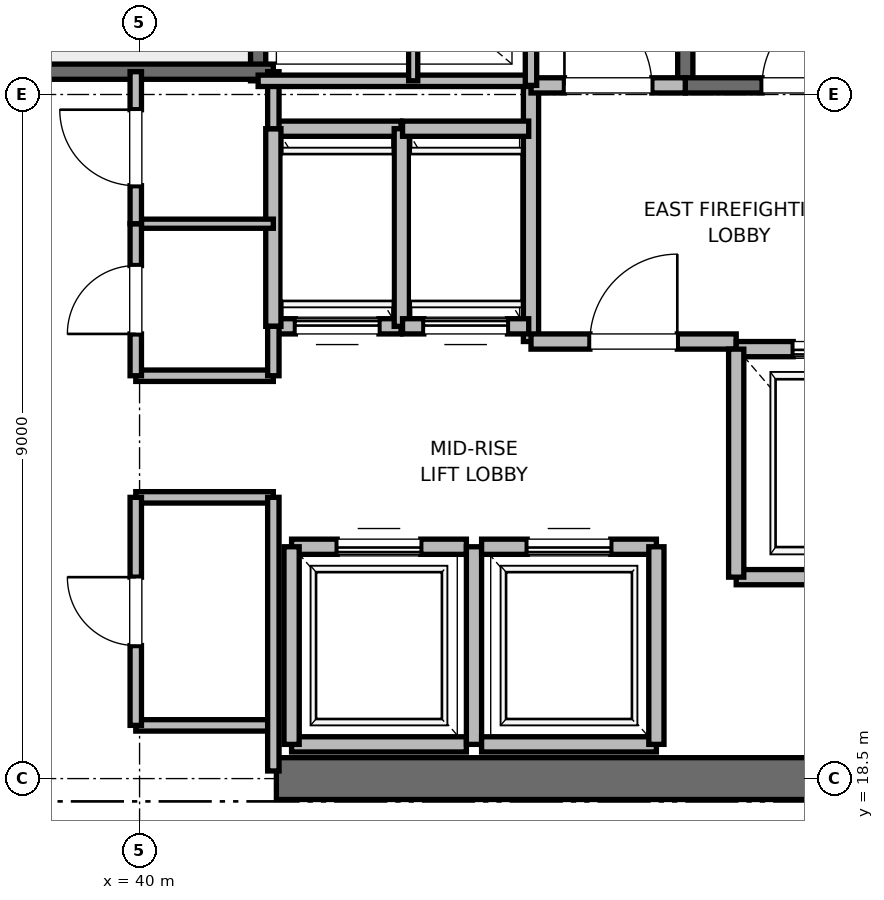
"""IFC4 building model, lengths in metres.
Left out: names, types, materials, properties, quantities, classifications, styles, units other than length and angle.
Written with IfcOpenShell. Run it as: python <this file> out.ifc"""

import sys

from ifc_helpers import new_model, si_unit, direction, frame, frame_2d, origin, place, context, subcontext, project, spatial, rectangle, extrude, element, fill, save


model = new_model("IFC4")
c1 = context("Model", 3, precision=1e-05, world=origin(), true_north=direction((0.0, 1.0)))
c2 = subcontext(c1, "Body", "Model", "MODEL_VIEW")
j1 = project(units=[si_unit("LENGTHUNIT", "METRE"), si_unit("PLANEANGLEUNIT", "RADIAN")], contexts=[c1])
p1 = place(None, origin())
s1 = spatial("IfcSite", under=j1, at=p1, CompositionType="ELEMENT")
p2 = place(p1, origin())
s2 = spatial("IfcBuilding", under=s1, at=p2, CompositionType="ELEMENT")
p3 = place(p2, frame((0.0, 0.0, 184.4)))
s3 = spatial("IfcBuildingStorey", under=s2, at=p3, CompositionType="ELEMENT", Elevation=184.4)
p4 = place(p3, frame((41.8, 18.5, 0.0), z_axis=(0.0, 0.0, 1.0), x_axis=(1.0, 0.0, 0.0)))
e1 = element("IfcWall", 1, at=p4, inside=s3, PredefinedType="SHEAR", context=c2, shape_type="SweptSolid", body=[
    extrude(rectangle(XDim=9.2, YDim=0.55, at=frame_2d((4.6, 0.0))), origin(), (0.0, 0.0, 1.0), 4.7),
])
p5 = place(p3, frame((47.18, 27.62, 0.0), z_axis=(0.0, 0.0, 1.0), x_axis=(0.0, 1.0, 0.0)))
e2 = element("IfcWall", 2, at=p5, inside=s3, PredefinedType="SOLIDWALL", context=c2, shape_type="SweptSolid", body=[
    extrude(rectangle(XDim=8.18, YDim=0.2, at=frame_2d((4.09, 0.0))), origin(), (0.0, 0.0, 1.0), 4.7),
])
p6 = place(p3, frame((47.18, 27.62, 0.0), z_axis=(0.0, 0.0, 1.0), x_axis=(1.0, 0.0, 0.0)))
e3 = element("IfcWall", 3, at=p6, inside=s3, PredefinedType="SOLIDWALL", context=c2, shape_type="SweptSolid", body=[
    extrude(rectangle(XDim=3.12, YDim=0.2, at=frame_2d((1.56, 0.0))), origin(), (0.0, 0.0, 1.0), 4.7),
])
p7 = place(p6, frame((1.01, 0.0, 0.0)))
e4 = element("IfcOpeningElement", 4, at=p7, cuts=e3, PredefinedType="OPENING", context=c2, shape_type="SweptSolid", body=[
    extrude(rectangle(XDim=1.1, YDim=2.15, at=frame_2d((0.55, 1.075))), frame((0.0, 0.1, 0.0), z_axis=(0.0, -1.0, 0.0), x_axis=(1.0, 0.0, 0.0)), (0.0, 0.0, 1.0), 0.2),
])
p8 = place(p3, frame((41.56, 27.68, 0.0), z_axis=(0.0, 0.0, 1.0), x_axis=(0.0, 1.0, 0.0)))
e5 = element("IfcWall", 5, at=p8, inside=s3, PredefinedType="SOLIDWALL", context=c2, shape_type="SweptSolid", body=[
    extrude(rectangle(XDim=8.57, YDim=0.2, at=frame_2d((4.285, 0.0))), origin(), (0.0, 0.0, 1.0), 4.7),
])
p9 = place(p3, frame((38.44, 27.8, 0.0), z_axis=(0.0, 0.0, 1.0), x_axis=(1.0, 0.0, 0.0)))
e6 = element("IfcWall", 6, at=p9, inside=s3, PredefinedType="SOLIDWALL", context=c2, shape_type="SweptSolid", body=[
    extrude(rectangle(XDim=3.32, YDim=0.2, at=frame_2d((1.66, 0.0))), origin(), (0.0, 0.0, 1.0), 4.7),
])
p10 = place(p3, frame((45.15, 24.25, 0.0), z_axis=(0.0, 0.0, 1.0), x_axis=(0.0, 1.0, 0.0)))
e7 = element("IfcWall", 7, at=p10, inside=s3, PredefinedType="PARTITIONING", context=c2, shape_type="SweptSolid", body=[
    extrude(rectangle(XDim=3.37, YDim=0.2, at=frame_2d((1.685, 0.0))), origin(), (0.0, 0.0, 1.0), 4.7),
])
p11 = place(p3, frame((45.15, 24.25, 0.0), z_axis=(0.0, 0.0, 1.0), x_axis=(1.0, 0.0, 0.0)))
e8 = element("IfcWall", 8, at=p11, inside=s3, PredefinedType="PARTITIONING", context=c2, shape_type="SweptSolid", body=[
    extrude(rectangle(XDim=2.7, YDim=0.2, at=frame_2d((1.35, 0.0))), origin(), (0.0, 0.0, 1.0), 4.7),
])
p12 = place(p11, frame((0.775, 0.0, 0.0)))
e9 = element("IfcOpeningElement", 9, at=p12, cuts=e8, PredefinedType="OPENING", context=c2, shape_type="SweptSolid", body=[
    extrude(rectangle(XDim=1.15, YDim=2.2, at=frame_2d((0.575, 1.1))), frame((0.0, 0.1, 0.0), z_axis=(0.0, -1.0, 0.0), x_axis=(1.0, 0.0, 0.0)), (0.0, 0.0, 1.0), 0.2),
])
p13 = place(p3, frame((45.15, 27.62, 0.0), z_axis=(0.0, 0.0, 1.0), x_axis=(1.0, 0.0, 0.0)))
e10 = element("IfcWall", 10, at=p13, inside=s3, PredefinedType="PARTITIONING", context=c2, shape_type="SweptSolid", body=[
    extrude(rectangle(XDim=2.03, YDim=0.2, at=frame_2d((1.015, 0.0))), origin(), (0.0, 0.0, 1.0), 4.7),
])
p14 = place(p13, frame((0.44, 0.0, 0.0)))
e11 = element("IfcOpeningElement", 11, at=p14, cuts=e10, PredefinedType="OPENING", context=c2, shape_type="SweptSolid", body=[
    extrude(rectangle(XDim=1.15, YDim=2.2, at=frame_2d((0.575, 1.1))), frame((0.0, 0.1, 0.0), z_axis=(0.0, -1.0, 0.0), x_axis=(1.0, 0.0, 0.0)), (0.0, 0.0, 1.0), 0.2),
])
p15 = place(p3, frame((47.85, 21.15, 0.0), z_axis=(0.0, 0.0, 1.0), x_axis=(1.0, 0.0, 0.0)))
e12 = element("IfcWall", 12, at=p15, inside=s3, PredefinedType="SOLIDWALL", context=c2, shape_type="SweptSolid", body=[
    extrude(rectangle(XDim=2.6, YDim=0.2, at=frame_2d((1.3, 0.0))), origin(), (0.0, 0.0, 1.0), 4.7),
])
p16 = place(p3, frame((50.45, 24.15, 0.0), z_axis=(0.0, 0.0, 1.0), x_axis=(-1.0, 0.0, 0.0)))
e13 = element("IfcWall", 13, at=p16, inside=s3, PredefinedType="SOLIDWALL", context=c2, shape_type="SweptSolid", body=[
    extrude(rectangle(XDim=2.6, YDim=0.2, at=frame_2d((1.3, 0.0))), origin(), (0.0, 0.0, 1.0), 3.68),
])
p17 = place(p16, frame((0.75, 0.0, 0.0)))
e14 = element("IfcOpeningElement", 14, at=p17, cuts=e13, PredefinedType="OPENING", context=c2, shape_type="SweptSolid", body=[
    extrude(rectangle(XDim=1.1, YDim=2.2, at=frame_2d((0.55, 1.1))), frame((0.0, 0.1, 0.0), z_axis=(0.0, -1.0, 0.0), x_axis=(1.0, 0.0, 0.0)), (0.0, 0.0, 1.0), 0.2),
])
p18 = place(p3, frame((47.85, 24.15, 0.0), z_axis=(0.0, 0.0, 1.0), x_axis=(0.0, -1.0, 0.0)))
e15 = element("IfcWall", 15, at=p18, inside=s3, PredefinedType="SOLIDWALL", context=c2, shape_type="SweptSolid", body=[
    extrude(rectangle(XDim=3.0, YDim=0.2, at=frame_2d((1.5, 0.0))), origin(), (0.0, 0.0, 1.0), 4.7),
])
p19 = place(p3, frame((42.0, 18.95, 0.0), z_axis=(0.0, 0.0, 1.0), x_axis=(1.0, 0.0, 0.0)))
e16 = element("IfcWall", 16, at=p19, inside=s3, PredefinedType="SOLIDWALL", context=c2, shape_type="SweptSolid", body=[
    extrude(rectangle(XDim=2.3, YDim=0.2, at=frame_2d((1.15, 0.0))), origin(), (0.0, 0.0, 1.0), 3.68),
])
p20 = place(p3, frame((44.3, 21.55, 0.0), z_axis=(0.0, 0.0, 1.0), x_axis=(-1.0, 0.0, 0.0)))
e17 = element("IfcWall", 17, at=p20, inside=s3, PredefinedType="SOLIDWALL", context=c2, shape_type="SweptSolid", body=[
    extrude(rectangle(XDim=2.3, YDim=0.2, at=frame_2d((1.15, 0.0))), origin(), (0.0, 0.0, 1.0), 4.7),
])
p21 = place(p20, frame((0.6, 0.0, 0.0)))
e18 = element("IfcOpeningElement", 18, at=p21, cuts=e17, PredefinedType="OPENING", context=c2, shape_type="SweptSolid", body=[
    extrude(rectangle(XDim=1.1, YDim=2.2, at=frame_2d((0.55, 1.1))), frame((0.0, 0.1, 0.0), z_axis=(0.0, -1.0, 0.0), x_axis=(1.0, 0.0, 0.0)), (0.0, 0.0, 1.0), 0.2),
])
p22 = place(p3, frame((42.0, 21.55, 0.0), z_axis=(0.0, 0.0, 1.0), x_axis=(0.0, -1.0, 0.0)))
e19 = element("IfcWall", 19, at=p22, inside=s3, PredefinedType="SOLIDWALL", context=c2, shape_type="SweptSolid", body=[
    extrude(rectangle(XDim=2.6, YDim=0.2, at=frame_2d((1.3, 0.0))), origin(), (0.0, 0.0, 1.0), 3.68),
])
p23 = place(p3, frame((44.4, 18.95, 0.0), z_axis=(0.0, 0.0, 1.0), x_axis=(0.0, 1.0, 0.0)))
e20 = element("IfcWall", 20, at=p23, inside=s3, PredefinedType="SOLIDWALL", context=c2, shape_type="SweptSolid", body=[
    extrude(rectangle(XDim=2.6, YDim=0.2, at=frame_2d((1.3, 0.0))), origin(), (0.0, 0.0, 1.0), 4.7),
])
p24 = place(p3, frame((44.5, 18.95, 0.0), z_axis=(0.0, 0.0, 1.0), x_axis=(1.0, 0.0, 0.0)))
e21 = element("IfcWall", 21, at=p24, inside=s3, PredefinedType="SOLIDWALL", context=c2, shape_type="SweptSolid", body=[
    extrude(rectangle(XDim=2.3, YDim=0.2, at=frame_2d((1.15, 0.0))), origin(), (0.0, 0.0, 1.0), 4.7),
])
p25 = place(p3, frame((46.8, 21.55, 0.0), z_axis=(0.0, 0.0, 1.0), x_axis=(-1.0, 0.0, 0.0)))
e22 = element("IfcWall", 22, at=p25, inside=s3, PredefinedType="SOLIDWALL", context=c2, shape_type="SweptSolid", body=[
    extrude(rectangle(XDim=2.3, YDim=0.2, at=frame_2d((1.15, 0.0))), origin(), (0.0, 0.0, 1.0), 4.7),
])
p26 = place(p25, frame((0.6, 0.0, 0.0)))
e23 = element("IfcOpeningElement", 23, at=p26, cuts=e22, PredefinedType="OPENING", context=c2, shape_type="SweptSolid", body=[
    extrude(rectangle(XDim=1.1, YDim=2.2, at=frame_2d((0.55, 1.1))), frame((0.0, 0.1, 0.0), z_axis=(0.0, -1.0, 0.0), x_axis=(1.0, 0.0, 0.0)), (0.0, 0.0, 1.0), 0.2),
])
p27 = place(p3, frame((46.8, 18.95, 0.0), z_axis=(0.0, 0.0, 1.0), x_axis=(0.0, 1.0, 0.0)))
e24 = element("IfcWall", 24, at=p27, inside=s3, PredefinedType="SOLIDWALL", context=c2, shape_type="SweptSolid", body=[
    extrude(rectangle(XDim=2.6, YDim=0.2, at=frame_2d((1.3, 0.0))), origin(), (0.0, 0.0, 1.0), 4.7),
])
p28 = place(p3, frame((41.76, 24.45, 0.0), z_axis=(0.0, 0.0, 1.0), x_axis=(1.0, 0.0, 0.0)))
e25 = element("IfcWall", 25, at=p28, inside=s3, PredefinedType="SOLIDWALL", context=c2, shape_type="SweptSolid", body=[
    extrude(rectangle(XDim=1.68, YDim=0.2, at=frame_2d((0.84, 0.0))), origin(), (0.0, 0.0, 1.0), 4.7),
])
p29 = place(p28, frame((0.29, 0.0, 0.0)))
e26 = element("IfcOpeningElement", 26, at=p29, cuts=e25, PredefinedType="OPENING", context=c2, shape_type="SweptSolid", body=[
    extrude(rectangle(XDim=1.1, YDim=2.2, at=frame_2d((0.55, 1.1))), frame((0.0, 0.1, 0.0), z_axis=(0.0, -1.0, 0.0), x_axis=(1.0, 0.0, 0.0)), (0.0, 0.0, 1.0), 0.2),
])
p30 = place(p3, frame((43.44, 27.05, 0.0), z_axis=(0.0, 0.0, 1.0), x_axis=(-1.0, 0.0, 0.0)))
e27 = element("IfcWall", 27, at=p30, inside=s3, PredefinedType="SOLIDWALL", context=c2, shape_type="SweptSolid", body=[
    extrude(rectangle(XDim=1.68, YDim=0.2, at=frame_2d((0.84, 0.0))), origin(), (0.0, 0.0, 1.0), 4.7),
])
for number, where, z_axis, x_axis in (
    (28, (41.76, 27.05, 0.0), (0.0, 0.0, 1.0), (0.0, -1.0, 0.0)),
    (29, (43.45, 24.45, 0.0), (0.0, 0.0, 1.0), (0.0, 1.0, 0.0)),
):
    element("IfcWall", number, at=place(p3, frame(where, z_axis=z_axis, x_axis=x_axis)), inside=s3, PredefinedType="SOLIDWALL", context=c2, shape_type="SweptSolid", body=[
        extrude(rectangle(XDim=2.6, YDim=0.2, at=frame_2d((1.3, 0.0))), origin(), (0.0, 0.0, 1.0), 4.7),
    ])
p31 = place(p3, frame((43.46, 24.45, 0.0), z_axis=(0.0, 0.0, 1.0), x_axis=(1.0, 0.0, 0.0)))
e30 = element("IfcWall", 30, at=p31, inside=s3, PredefinedType="SOLIDWALL", context=c2, shape_type="SweptSolid", body=[
    extrude(rectangle(XDim=1.66, YDim=0.2, at=frame_2d((0.83, 0.0))), origin(), (0.0, 0.0, 1.0), 4.7),
])
p32 = place(p31, frame((0.28, 0.0, 0.0)))
e31 = element("IfcOpeningElement", 31, at=p32, cuts=e30, PredefinedType="OPENING", context=c2, shape_type="SweptSolid", body=[
    extrude(rectangle(XDim=1.1, YDim=2.2, at=frame_2d((0.55, 1.1))), frame((0.0, 0.1, 0.0), z_axis=(0.0, -1.0, 0.0), x_axis=(1.0, 0.0, 0.0)), (0.0, 0.0, 1.0), 0.2),
])
p33 = place(p3, frame((45.12, 27.05, 0.0), z_axis=(0.0, 0.0, 1.0), x_axis=(-1.0, 0.0, 0.0)))
e32 = element("IfcWall", 32, at=p33, inside=s3, PredefinedType="SOLIDWALL", context=c2, shape_type="SweptSolid", body=[
    extrude(rectangle(XDim=1.66, YDim=0.2, at=frame_2d((0.83, 0.0))), origin(), (0.0, 0.0, 1.0), 4.7),
])
for number, where, z_axis, x_axis in (
    (33, (39.95, 19.2, 0.0), (0.0, 0.0, 1.0), (1.0, 0.0, 0.0)),
    (34, (39.95, 22.2, 0.0), (0.0, 0.0, 1.0), (1.0, 0.0, 0.0)),
    (35, (39.95, 23.8, 0.0), (0.0, 0.0, 1.0), (1.0, 0.0, 0.0)),
):
    element("IfcWall", number, at=place(p3, frame(where, z_axis=z_axis, x_axis=x_axis)), inside=s3, PredefinedType="PARTITIONING", context=c2, shape_type="SweptSolid", body=[
        extrude(rectangle(XDim=1.81, YDim=0.15, at=frame_2d((0.905, 0.0))), origin(), (0.0, 0.0, 1.0), 2.85),
    ])
p34 = place(p3, frame((39.95, 25.8, 0.0), z_axis=(0.0, 0.0, 1.0), x_axis=(1.0, 0.0, 0.0)))
e36 = element("IfcWall", 36, at=p34, inside=s3, PredefinedType="PARTITIONING", context=c2, shape_type="SweptSolid", body=[
    extrude(rectangle(XDim=1.81, YDim=0.12, at=frame_2d((0.905, 0.0))), origin(), (0.0, 0.0, 1.0), 2.85),
])
p35 = place(p3, frame((41.76, 18.6, 0.0), z_axis=(0.0, 0.0, 1.0), x_axis=(0.0, 1.0, 0.0)))
e37 = element("IfcWall", 37, at=p35, inside=s3, PredefinedType="PARTITIONING", context=c2, shape_type="SweptSolid", body=[
    extrude(rectangle(XDim=3.6, YDim=0.15, at=frame_2d((1.8, 0.0))), origin(), (0.0, 0.0, 1.0), 2.85),
])
p36 = place(p3, frame((41.76, 23.8, 0.0), z_axis=(0.0, 0.0, 1.0), x_axis=(0.0, 1.0, 0.0)))
e38 = element("IfcWall", 38, at=p36, inside=s3, PredefinedType="PARTITIONING", context=c2, shape_type="SweptSolid", body=[
    extrude(rectangle(XDim=0.65, YDim=0.15, at=frame_2d((0.325, 0.0))), origin(), (0.0, 0.0, 1.0), 2.85),
])
p37 = place(p3, frame((41.76, 27.05, 0.0), z_axis=(0.0, 0.0, 1.0), x_axis=(0.0, 1.0, 0.0)))
e39 = element("IfcWall", 39, at=p37, inside=s3, PredefinedType="PARTITIONING", context=c2, shape_type="SweptSolid", body=[
    extrude(rectangle(XDim=0.75, YDim=0.15, at=frame_2d((0.375, 0.0))), origin(), (0.0, 0.0, 1.0), 2.85),
])
p38 = place(p3, frame((39.95, 19.2, 0.0), z_axis=(0.0, 0.0, 1.0), x_axis=(0.0, 1.0, 0.0)))
e40 = element("IfcWall", 40, at=p38, inside=s3, PredefinedType="PARTITIONING", context=c2, shape_type="SweptSolid", body=[
    extrude(rectangle(XDim=3.0, YDim=0.15, at=frame_2d((1.5, 0.0))), origin(), (0.0, 0.0, 1.0), 2.85),
])
p39 = place(p38, frame((1.05, 0.0, 0.0)))
e41 = element("IfcOpeningElement", 41, at=p39, cuts=e40, PredefinedType="OPENING", context=c2, shape_type="SweptSolid", body=[
    extrude(rectangle(XDim=0.9, YDim=2.1, at=frame_2d((0.45, 1.05))), frame((0.0, 0.075, 0.0), z_axis=(0.0, -1.0, 0.0), x_axis=(1.0, 0.0, 0.0)), (0.0, 0.0, 1.0), 0.15),
])
p40 = place(p3, frame((39.95, 23.8, 0.0), z_axis=(0.0, 0.0, 1.0), x_axis=(0.0, 1.0, 0.0)))
e42 = element("IfcWall", 42, at=p40, inside=s3, PredefinedType="PARTITIONING", context=c2, shape_type="SweptSolid", body=[
    extrude(rectangle(XDim=2.0, YDim=0.15, at=frame_2d((1.0, 0.0))), origin(), (0.0, 0.0, 1.0), 2.85),
])
p41 = place(p40, frame((0.55, 0.0, 0.0)))
e43 = element("IfcOpeningElement", 43, at=p41, cuts=e42, PredefinedType="OPENING", context=c2, shape_type="SweptSolid", body=[
    extrude(rectangle(XDim=0.9, YDim=2.1, at=frame_2d((0.45, 1.05))), frame((0.0, 0.075, 0.0), z_axis=(0.0, -1.0, 0.0), x_axis=(1.0, 0.0, 0.0)), (0.0, 0.0, 1.0), 0.15),
])
p42 = place(p3, frame((39.95, 25.8, 0.0), z_axis=(0.0, 0.0, 1.0), x_axis=(0.0, 1.0, 0.0)))
e44 = element("IfcWall", 44, at=p42, inside=s3, PredefinedType="PARTITIONING", context=c2, shape_type="SweptSolid", body=[
    extrude(rectangle(XDim=2.0, YDim=0.15, at=frame_2d((1.0, 0.0))), origin(), (0.0, 0.0, 1.0), 2.85),
])
p43 = place(p42, frame((0.5, 0.0, 0.0)))
e45 = element("IfcOpeningElement", 45, at=p43, cuts=e44, PredefinedType="OPENING", context=c2, shape_type="SweptSolid", body=[
    extrude(rectangle(XDim=1.0, YDim=2.15, at=frame_2d((0.5, 1.075))), frame((0.0, 0.075, 0.0), z_axis=(0.0, -1.0, 0.0), x_axis=(1.0, 0.0, 0.0)), (0.0, 0.0, 1.0), 0.15),
])
p44 = place(p3, frame((41.56, 27.68, 0.0), z_axis=(0.0, 0.0, 1.0), x_axis=(1.0, 0.0, 0.0)))
e46 = element("IfcWall", 46, at=p44, inside=s3, PredefinedType="PARTITIONING", context=c2, shape_type="SweptSolid", body=[
    extrude(rectangle(XDim=3.59, YDim=0.15, at=frame_2d((1.795, 0.0))), origin(), (0.0, 0.0, 1.0), 2.85),
])
p45 = place(p3, frame((45.15, 27.62, 0.0), z_axis=(0.0, 0.0, 1.0), x_axis=(0.0, 1.0, 0.0)))
e47 = element("IfcWall", 47, at=p45, inside=s3, PredefinedType="PARTITIONING", context=c2, shape_type="SweptSolid", body=[
    extrude(rectangle(XDim=3.1, YDim=0.15, at=frame_2d((1.55, 0.0))), origin(), (0.0, 0.0, 1.0), 2.85),
])
p46 = place(p3, frame((43.6, 27.68, 0.0), z_axis=(0.0, 0.0, 1.0), x_axis=(0.0, 1.0, 0.0)))
e48 = element("IfcWall", 48, at=p46, inside=s3, PredefinedType="PARTITIONING", context=c2, shape_type="SweptSolid", body=[
    extrude(rectangle(XDim=3.04, YDim=0.12, at=frame_2d((1.52, 0.0))), origin(), (0.0, 0.0, 1.0), 2.85),
])
p47 = place(p7, origin())
e49 = element("IfcDoor", 49, at=p47, inside=s3, OperationType="SINGLE_SWING_RIGHT", PredefinedType="DOOR", context=c2, shape_type="SweptSolid", body=[
    extrude(rectangle(XDim=1.1, YDim=2.15, at=frame_2d((0.55, 1.075))), frame((0.0, 0.025, 0.0), z_axis=(0.0, -1.0, 0.0), x_axis=(1.0, 0.0, 0.0)), (0.0, 0.0, 1.0), 0.05),
])
fill(e4, e49)
p48 = place(p12, origin())
e50 = element("IfcDoor", 50, at=p48, inside=s3, OperationType="SINGLE_SWING_RIGHT", PredefinedType="DOOR", context=c2, shape_type="SweptSolid", body=[
    extrude(rectangle(XDim=1.15, YDim=2.2, at=frame_2d((0.575, 1.1))), frame((0.0, 0.025, 0.0), z_axis=(0.0, -1.0, 0.0), x_axis=(1.0, 0.0, 0.0)), (0.0, 0.0, 1.0), 0.05),
])
fill(e9, e50)
p49 = place(p14, origin())
e51 = element("IfcDoor", 51, at=p49, inside=s3, OperationType="SINGLE_SWING_LEFT", PredefinedType="DOOR", context=c2, shape_type="SweptSolid", body=[
    extrude(rectangle(XDim=1.15, YDim=2.2, at=frame_2d((0.575, 1.1))), frame((0.0, 0.025, 0.0), z_axis=(0.0, -1.0, 0.0), x_axis=(1.0, 0.0, 0.0)), (0.0, 0.0, 1.0), 0.05),
])
fill(e11, e51)
p50 = place(p17, origin())
e52 = element("IfcDoor", 52, at=p50, inside=s3, OperationType="SLIDING_TO_RIGHT", PredefinedType="DOOR", context=c2, shape_type="SweptSolid", body=[
    extrude(rectangle(XDim=1.1, YDim=2.2, at=frame_2d((0.55, 1.1))), frame((0.0, 0.025, 0.0), z_axis=(0.0, -1.0, 0.0), x_axis=(1.0, 0.0, 0.0)), (0.0, 0.0, 1.0), 0.05),
])
fill(e14, e52)
p51 = place(p21, origin())
e53 = element("IfcDoor", 53, at=p51, inside=s3, OperationType="SLIDING_TO_RIGHT", PredefinedType="DOOR", context=c2, shape_type="SweptSolid", body=[
    extrude(rectangle(XDim=1.1, YDim=2.2, at=frame_2d((0.55, 1.1))), frame((0.0, 0.025, 0.0), z_axis=(0.0, -1.0, 0.0), x_axis=(1.0, 0.0, 0.0)), (0.0, 0.0, 1.0), 0.05),
])
fill(e18, e53)
p52 = place(p26, origin())
e54 = element("IfcDoor", 54, at=p52, inside=s3, OperationType="SLIDING_TO_RIGHT", PredefinedType="DOOR", context=c2, shape_type="SweptSolid", body=[
    extrude(rectangle(XDim=1.1, YDim=2.2, at=frame_2d((0.55, 1.1))), frame((0.0, 0.025, 0.0), z_axis=(0.0, -1.0, 0.0), x_axis=(1.0, 0.0, 0.0)), (0.0, 0.0, 1.0), 0.05),
])
fill(e23, e54)
p53 = place(p29, origin())
e55 = element("IfcDoor", 55, at=p53, inside=s3, OperationType="SLIDING_TO_RIGHT", PredefinedType="DOOR", context=c2, shape_type="SweptSolid", body=[
    extrude(rectangle(XDim=1.1, YDim=2.2, at=frame_2d((0.55, 1.1))), frame((0.0, 0.025, 0.0), z_axis=(0.0, -1.0, 0.0), x_axis=(1.0, 0.0, 0.0)), (0.0, 0.0, 1.0), 0.05),
])
fill(e26, e55)
p54 = place(p32, origin())
e56 = element("IfcDoor", 56, at=p54, inside=s3, OperationType="SLIDING_TO_RIGHT", PredefinedType="DOOR", context=c2, shape_type="SweptSolid", body=[
    extrude(rectangle(XDim=1.1, YDim=2.2, at=frame_2d((0.55, 1.1))), frame((0.0, 0.025, 0.0), z_axis=(0.0, -1.0, 0.0), x_axis=(1.0, 0.0, 0.0)), (0.0, 0.0, 1.0), 0.05),
])
fill(e31, e56)
p55 = place(p39, origin())
e57 = element("IfcDoor", 57, at=p55, inside=s3, OperationType="SINGLE_SWING_RIGHT", PredefinedType="DOOR", context=c2, shape_type="SweptSolid", body=[
    extrude(rectangle(XDim=0.9, YDim=2.1, at=frame_2d((0.45, 1.05))), frame((0.0, 0.025, 0.0), z_axis=(0.0, -1.0, 0.0), x_axis=(1.0, 0.0, 0.0)), (0.0, 0.0, 1.0), 0.05),
])
fill(e41, e57)
p56 = place(p41, origin())
e58 = element("IfcDoor", 58, at=p56, inside=s3, OperationType="SINGLE_SWING_LEFT", PredefinedType="DOOR", context=c2, shape_type="SweptSolid", body=[
    extrude(rectangle(XDim=0.9, YDim=2.1, at=frame_2d((0.45, 1.05))), frame((0.0, 0.025, 0.0), z_axis=(0.0, -1.0, 0.0), x_axis=(1.0, 0.0, 0.0)), (0.0, 0.0, 1.0), 0.05),
])
fill(e43, e58)
p57 = place(p43, origin())
e59 = element("IfcDoor", 59, at=p57, inside=s3, OperationType="SINGLE_SWING_RIGHT", PredefinedType="DOOR", context=c2, shape_type="SweptSolid", body=[
    extrude(rectangle(XDim=1.0, YDim=2.15, at=frame_2d((0.5, 1.075))), frame((0.0, 0.025, 0.0), z_axis=(0.0, -1.0, 0.0), x_axis=(1.0, 0.0, 0.0)), (0.0, 0.0, 1.0), 0.05),
])
fill(e45, e59)
save(model, sys.argv[1])
